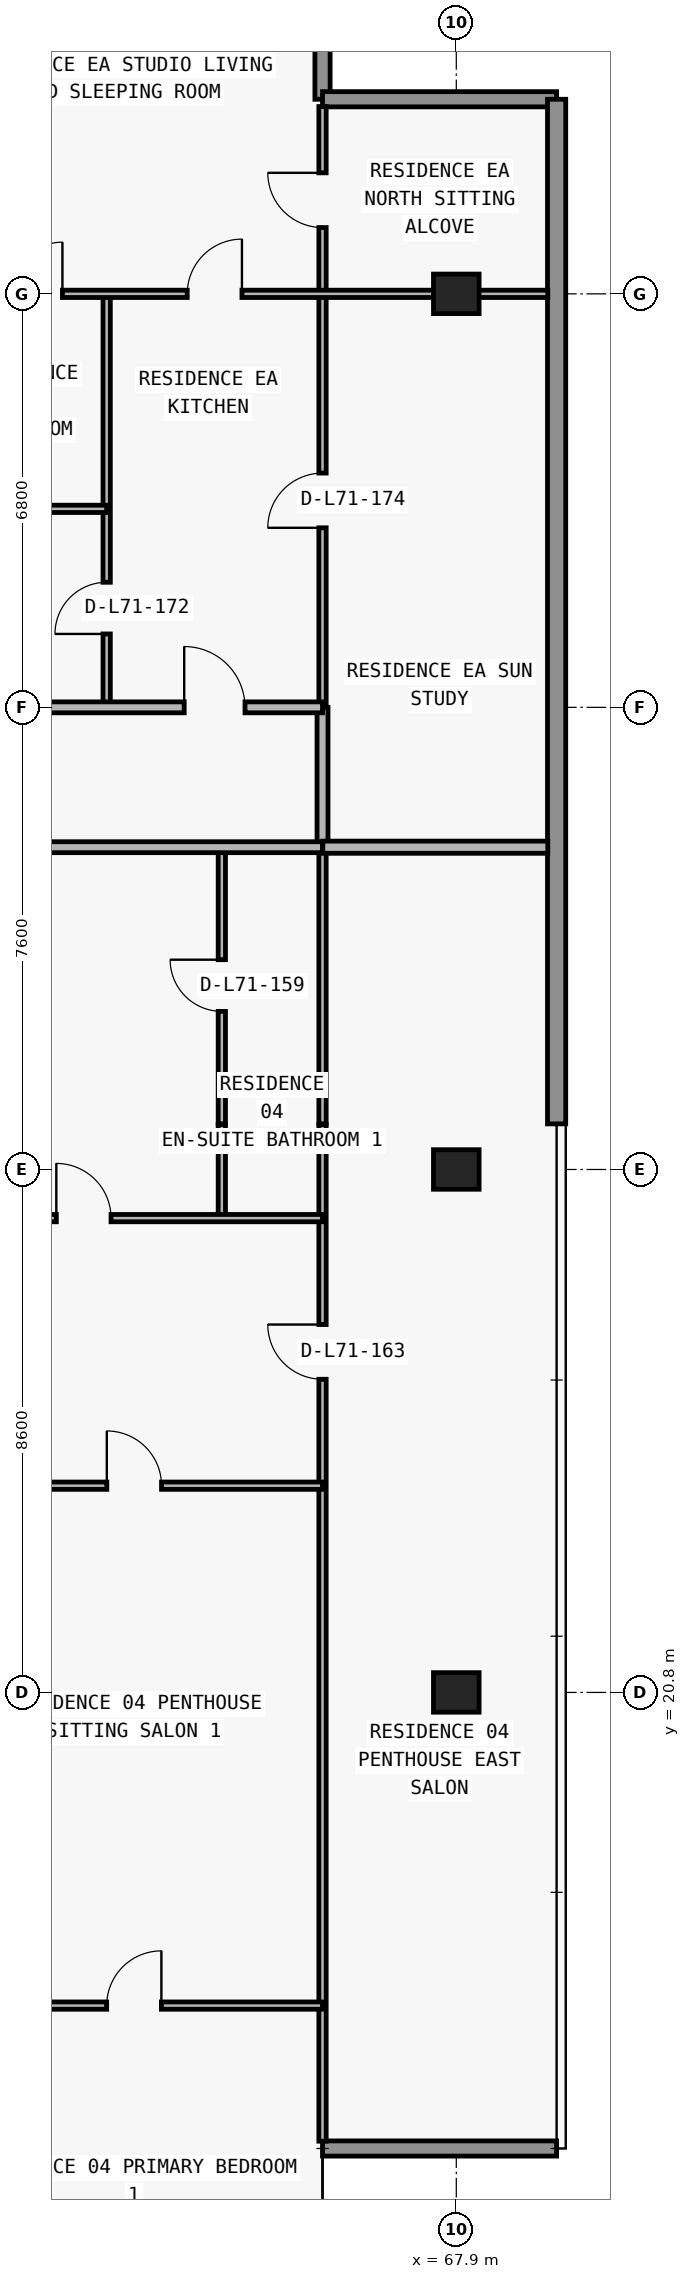
"""IFC4 building model, lengths in metres.
Left out: names, types, materials, properties, quantities, classifications, styles, units other than length and angle.
Written with IfcOpenShell. Run it as: python <this file> out.ifc"""

import sys

from ifc_helpers import new_model, si_unit, direction, frame, frame_2d, origin, origin_2d, place, context, subcontext, project, spatial, rectangle, extrude, element, fill, save


model = new_model("IFC4")
c1 = context("Model", 3, precision=1e-05, world=origin(), true_north=direction((0.0, 1.0)))
c2 = subcontext(c1, "Body", "Model", "MODEL_VIEW")
j1 = project(units=[si_unit("LENGTHUNIT", "METRE"), si_unit("PLANEANGLEUNIT", "RADIAN")], contexts=[c1])
p1 = place(None, origin())
s1 = spatial("IfcSite", under=j1, at=p1, CompositionType="ELEMENT")
p2 = place(p1, origin())
s2 = spatial("IfcBuilding", under=s1, at=p2, CompositionType="ELEMENT")
p3 = place(p2, frame((0.0, 0.0, 252.9)))
s3 = spatial("IfcBuildingStorey", under=s2, at=p3, CompositionType="ELEMENT", Elevation=252.9)
for number, where, z_axis, x_axis in (
    (1, (67.9, 20.8, 0.0), (0.0, 0.0, 1.0), (1.0, 0.0, 0.0)),
    (2, (67.9, 29.4, 0.0), (0.0, 0.0, 1.0), (1.0, 0.0, 0.0)),
    (3, (67.9, 43.8, 0.0), (0.0, 0.0, 1.0), (1.0, 0.0, 0.0)),
):
    element("IfcColumn", number, at=place(p3, frame(where, z_axis=z_axis, x_axis=x_axis)), inside=s3, PredefinedType="COLUMN", context=c2, shape_type="SweptSolid", body=[
        extrude(rectangle(XDim=0.75, YDim=0.65, at=origin_2d()), origin(), (0.0, 0.0, 1.0), 3.05),
    ])
p4 = place(p3, frame((65.7, 13.3, 0.0), z_axis=(0.0, 0.0, 1.0), x_axis=(1.0, 0.0, 0.0)))
e4 = element("IfcWall", 4, at=p4, inside=s3, PredefinedType="ELEMENTEDWALL", context=c2, shape_type="SweptSolid", body=[
    extrude(rectangle(XDim=3.85, YDim=0.25, at=frame_2d((1.925, 0.0))), origin(), (0.0, 0.0, 1.0), 3.05),
])
p5 = place(p3, frame((65.7, 50.45, 0.0), z_axis=(0.0, 0.0, 1.0), x_axis=(0.0, -1.0, 0.0)))
e5 = element("IfcWall", 5, at=p5, inside=s3, PredefinedType="ELEMENTEDWALL", context=c2, shape_type="SweptSolid", body=[
    extrude(rectangle(XDim=3.45, YDim=0.25, at=frame_2d((1.725, 0.0))), origin(), (0.0, 0.0, 1.0), 3.05),
])
p6 = place(p3, frame((65.7, 47.0, 0.0), z_axis=(0.0, 0.0, 1.0), x_axis=(1.0, 0.0, 0.0)))
e6 = element("IfcWall", 6, at=p6, inside=s3, PredefinedType="ELEMENTEDWALL", context=c2, shape_type="SweptSolid", body=[
    extrude(rectangle(XDim=3.85, YDim=0.25, at=frame_2d((1.925, 0.0))), origin(), (0.0, 0.0, 1.0), 3.05),
])
p7 = place(p3, frame((69.55, 47.0, 0.0), z_axis=(0.0, 0.0, 1.0), x_axis=(0.0, -1.0, 0.0)))
e7 = element("IfcWall", 7, at=p7, inside=s3, PredefinedType="STANDARD", context=c2, shape_type="SweptSolid", body=[
    extrude(rectangle(XDim=16.85, YDim=0.3, at=frame_2d((8.425, 0.0))), origin(), (0.0, 0.0, 1.0), 3.05),
])
p8 = place(p3, frame((62.15, 37.0, 0.0), z_axis=(0.0, 0.0, 1.0), x_axis=(0.0, 1.0, 0.0)))
e8 = element("IfcWall", 8, at=p8, inside=s3, PredefinedType="PARTITIONING", context=c2, shape_type="SweptSolid", body=[
    extrude(rectangle(XDim=6.8, YDim=0.12, at=frame_2d((3.4, 0.0))), origin(), (0.0, 0.0, 1.0), 3.05),
])
p9 = place(p8, frame((1.207, 0.0, 0.0)))
e9 = element("IfcOpeningElement", 9, at=p9, cuts=e8, PredefinedType="OPENING", context=c2, shape_type="SweptSolid", body=[
    extrude(rectangle(XDim=0.85, YDim=2.1, at=frame_2d((0.425, 1.05))), frame((0.0, 0.07, 0.0), z_axis=(0.0, -1.0, 0.0), x_axis=(1.0, 0.0, 0.0)), (0.0, 0.0, 1.0), 0.14),
])
p10 = place(p3, frame((64.044, 28.6, 0.0), z_axis=(0.0, 0.0, 1.0), x_axis=(0.0, 1.0, 0.0)))
e10 = element("IfcWall", 10, at=p10, inside=s3, PredefinedType="PARTITIONING", context=c2, shape_type="SweptSolid", body=[
    extrude(rectangle(XDim=1.54, YDim=0.12, at=frame_2d((0.77, 0.0))), origin(), (0.0, 0.0, 1.0), 3.05),
])
p11 = place(p3, frame((64.044, 30.15, 0.0), z_axis=(0.0, 0.0, 1.0), x_axis=(0.0, 1.0, 0.0)))
e11 = element("IfcWall", 11, at=p11, inside=s3, PredefinedType="PARTITIONING", context=c2, shape_type="SweptSolid", body=[
    extrude(rectangle(XDim=4.55, YDim=0.12, at=frame_2d((2.275, 0.0))), origin(), (0.0, 0.0, 1.0), 3.05),
])
p12 = place(p11, frame((1.85, 0.0, 0.0)))
e12 = element("IfcOpeningElement", 12, at=p12, cuts=e11, PredefinedType="OPENING", context=c2, shape_type="SweptSolid", body=[
    extrude(rectangle(XDim=0.85, YDim=2.1, at=frame_2d((0.425, 1.05))), frame((0.0, 0.07, 0.0), z_axis=(0.0, -1.0, 0.0), x_axis=(1.0, 0.0, 0.0)), (0.0, 0.0, 1.0), 0.14),
])
p13 = place(p3, frame((65.7, 13.42, 0.0), z_axis=(0.0, 0.0, 1.0), x_axis=(0.0, 1.0, 0.0)))
e13 = element("IfcWall", 13, at=p13, inside=s3, PredefinedType="PARTITIONING", context=c2, shape_type="SweptSolid", body=[
    extrude(rectangle(XDim=16.72, YDim=0.12, at=frame_2d((8.36, 0.0))), origin(), (0.0, 0.0, 1.0), 3.05),
])
p14 = place(p13, frame((12.53, 0.0, 0.0)))
e14 = element("IfcOpeningElement", 14, at=p14, cuts=e13, PredefinedType="OPENING", context=c2, shape_type="SweptSolid", body=[
    extrude(rectangle(XDim=0.9, YDim=2.15, at=frame_2d((0.45, 1.075))), frame((0.0, 0.07, 0.0), z_axis=(0.0, -1.0, 0.0), x_axis=(1.0, 0.0, 0.0)), (0.0, 0.0, 1.0), 0.14),
])
p15 = place(p3, frame((65.7, 30.15, 0.0), z_axis=(0.0, 0.0, 1.0), x_axis=(0.0, 1.0, 0.0)))
e15 = element("IfcWall", 15, at=p15, inside=s3, PredefinedType="PARTITIONING", context=c2, shape_type="SweptSolid", body=[
    extrude(rectangle(XDim=4.55, YDim=0.12, at=frame_2d((2.275, 0.0))), origin(), (0.0, 0.0, 1.0), 3.05),
])
p16 = place(p3, frame((65.7, 34.705, 0.0), z_axis=(0.0, 0.0, 1.0), x_axis=(0.0, 1.0, 0.0)))
e16 = element("IfcWall", 16, at=p16, inside=s3, PredefinedType="PARTITIONING", context=c2, shape_type="SweptSolid", body=[
    extrude(rectangle(XDim=2.295, YDim=0.18, at=frame_2d((1.147, 0.0))), origin(), (0.0, 0.0, 1.0), 3.05),
])
p17 = place(p3, frame((65.7, 37.005, 0.0), z_axis=(0.0, 0.0, 1.0), x_axis=(0.0, 1.0, 0.0)))
e17 = element("IfcWall", 17, at=p17, inside=s3, PredefinedType="PARTITIONING", context=c2, shape_type="SweptSolid", body=[
    extrude(rectangle(XDim=9.875, YDim=0.12, at=frame_2d((4.938, 0.0))), origin(), (0.0, 0.0, 1.0), 3.05),
])
p18 = place(p17, frame((2.948, 0.0, 0.0)))
e18 = element("IfcOpeningElement", 18, at=p18, cuts=e17, PredefinedType="OPENING", context=c2, shape_type="SweptSolid", body=[
    extrude(rectangle(XDim=0.9, YDim=2.15, at=frame_2d((0.45, 1.075))), frame((0.0, 0.07, 0.0), z_axis=(0.0, -1.0, 0.0), x_axis=(1.0, 0.0, 0.0)), (0.0, 0.0, 1.0), 0.14),
])
p19 = place(p17, frame((7.885, 0.0, 0.0)))
e19 = element("IfcOpeningElement", 19, at=p19, cuts=e17, PredefinedType="OPENING", context=c2, shape_type="SweptSolid", body=[
    extrude(rectangle(XDim=0.9, YDim=2.15, at=frame_2d((0.45, 1.075))), frame((0.0, 0.07, 0.0), z_axis=(0.0, -1.0, 0.0), x_axis=(1.0, 0.0, 0.0)), (0.0, 0.0, 1.0), 0.14),
])
p20 = place(p3, frame((59.5, 15.65, 0.0), z_axis=(0.0, 0.0, 1.0), x_axis=(1.0, 0.0, 0.0)))
e20 = element("IfcWall", 20, at=p20, inside=s3, PredefinedType="PARTITIONING", context=c2, shape_type="SweptSolid", body=[
    extrude(rectangle(XDim=6.2, YDim=0.12, at=frame_2d((3.1, 0.0))), origin(), (0.0, 0.0, 1.0), 3.05),
])
p21 = place(p20, frame((2.65, 0.0, 0.0)))
e21 = element("IfcOpeningElement", 21, at=p21, cuts=e20, PredefinedType="OPENING", context=c2, shape_type="SweptSolid", body=[
    extrude(rectangle(XDim=0.9, YDim=2.15, at=frame_2d((0.45, 1.075))), frame((0.0, 0.07, 0.0), z_axis=(0.0, -1.0, 0.0), x_axis=(1.0, 0.0, 0.0)), (0.0, 0.0, 1.0), 0.14),
])
p22 = place(p3, frame((59.505, 24.2, 0.0), z_axis=(0.0, 0.0, 1.0), x_axis=(1.0, 0.0, 0.0)))
e22 = element("IfcWall", 22, at=p22, inside=s3, PredefinedType="PARTITIONING", context=c2, shape_type="SweptSolid", body=[
    extrude(rectangle(XDim=6.195, YDim=0.12, at=frame_2d((3.098, 0.0))), origin(), (0.0, 0.0, 1.0), 3.05),
])
p23 = place(p22, frame((2.647, 0.0, 0.0)))
e23 = element("IfcOpeningElement", 23, at=p23, cuts=e22, PredefinedType="OPENING", context=c2, shape_type="SweptSolid", body=[
    extrude(rectangle(XDim=0.9, YDim=2.15, at=frame_2d((0.45, 1.075))), frame((0.0, 0.07, 0.0), z_axis=(0.0, -1.0, 0.0), x_axis=(1.0, 0.0, 0.0)), (0.0, 0.0, 1.0), 0.14),
])
p24 = place(p3, frame((59.5, 28.6, 0.0), z_axis=(0.0, 0.0, 1.0), x_axis=(1.0, 0.0, 0.0)))
e24 = element("IfcWall", 24, at=p24, inside=s3, PredefinedType="PARTITIONING", context=c2, shape_type="SweptSolid", body=[
    extrude(rectangle(XDim=6.2, YDim=0.12, at=frame_2d((3.1, 0.0))), origin(), (0.0, 0.0, 1.0), 3.05),
])
p25 = place(p24, frame((1.822, 0.0, 0.0)))
e25 = element("IfcOpeningElement", 25, at=p25, cuts=e24, PredefinedType="OPENING", context=c2, shape_type="SweptSolid", body=[
    extrude(rectangle(XDim=0.9, YDim=2.15, at=frame_2d((0.45, 1.075))), frame((0.0, 0.07, 0.0), z_axis=(0.0, -1.0, 0.0), x_axis=(1.0, 0.0, 0.0)), (0.0, 0.0, 1.0), 0.14),
])
p26 = place(p3, frame((26.7, 34.7, 0.0), z_axis=(0.0, 0.0, 1.0), x_axis=(1.0, 0.0, 0.0)))
e26 = element("IfcWall", 26, at=p26, inside=s3, PredefinedType="PARTITIONING", context=c2, shape_type="SweptSolid", body=[
    extrude(rectangle(XDim=39.0, YDim=0.18, at=frame_2d((19.5, 0.0))), origin(), (0.0, 0.0, 1.0), 3.05),
])
p27 = place(p26, frame((2.827, 0.0, 0.0)))
e27 = element("IfcOpeningElement", 27, at=p27, cuts=e26, PredefinedType="OPENING", context=c2, shape_type="SweptSolid", body=[
    extrude(rectangle(XDim=1.0, YDim=2.2, at=frame_2d((0.5, 1.1))), frame((0.0, 0.1, 0.0), z_axis=(0.0, -1.0, 0.0), x_axis=(1.0, 0.0, 0.0)), (0.0, 0.0, 1.0), 0.2),
])
p28 = place(p26, frame((27.27, 0.0, 0.0)))
e28 = element("IfcOpeningElement", 28, at=p28, cuts=e26, PredefinedType="OPENING", context=c2, shape_type="SweptSolid", body=[
    extrude(rectangle(XDim=1.0, YDim=2.2, at=frame_2d((0.5, 1.1))), frame((0.0, 0.1, 0.0), z_axis=(0.0, -1.0, 0.0), x_axis=(1.0, 0.0, 0.0)), (0.0, 0.0, 1.0), 0.2),
])
p29 = place(p3, frame((65.705, 34.7, 0.0), z_axis=(0.0, 0.0, 1.0), x_axis=(1.0, 0.0, 0.0)))
e29 = element("IfcWall", 29, at=p29, inside=s3, PredefinedType="PARTITIONING", context=c2, shape_type="SweptSolid", body=[
    extrude(rectangle(XDim=3.7, YDim=0.2, at=frame_2d((1.85, 0.0))), origin(), (0.0, 0.0, 1.0), 3.05),
])
p30 = place(p3, frame((59.855, 37.0, 0.0), z_axis=(0.0, 0.0, 1.0), x_axis=(1.0, 0.0, 0.0)))
e30 = element("IfcWall", 30, at=p30, inside=s3, PredefinedType="PARTITIONING", context=c2, shape_type="SweptSolid", body=[
    extrude(rectangle(XDim=5.845, YDim=0.18, at=frame_2d((2.922, 0.0))), origin(), (0.0, 0.0, 1.0), 3.05),
])
p31 = place(p30, frame((3.57, 0.0, 0.0)))
e31 = element("IfcOpeningElement", 31, at=p31, cuts=e30, PredefinedType="OPENING", context=c2, shape_type="SweptSolid", body=[
    extrude(rectangle(XDim=1.0, YDim=2.2, at=frame_2d((0.5, 1.1))), frame((0.0, 0.1, 0.0), z_axis=(0.0, -1.0, 0.0), x_axis=(1.0, 0.0, 0.0)), (0.0, 0.0, 1.0), 0.2),
])
p32 = place(p3, frame((59.845, 40.264, 0.0), z_axis=(0.0, 0.0, 1.0), x_axis=(1.0, 0.0, 0.0)))
e32 = element("IfcWall", 32, at=p32, inside=s3, PredefinedType="PARTITIONING", context=c2, shape_type="SweptSolid", body=[
    extrude(rectangle(XDim=2.305, YDim=0.12, at=frame_2d((1.152, 0.0))), origin(), (0.0, 0.0, 1.0), 3.05),
])
p33 = place(p3, frame((59.845, 43.8, 0.0), z_axis=(0.0, 0.0, 1.0), x_axis=(1.0, 0.0, 0.0)))
e33 = element("IfcWall", 33, at=p33, inside=s3, PredefinedType="PARTITIONING", context=c2, shape_type="SweptSolid", body=[
    extrude(rectangle(XDim=9.56, YDim=0.12, at=frame_2d((4.78, 0.0))), origin(), (0.0, 0.0, 1.0), 2.418),
])
p34 = place(p33, frame((3.63, 0.0, 0.0)))
e34 = element("IfcOpeningElement", 34, at=p34, cuts=e33, PredefinedType="OPENING", context=c2, shape_type="SweptSolid", body=[
    extrude(rectangle(XDim=0.9, YDim=2.15, at=frame_2d((0.45, 1.075))), frame((0.0, 0.07, 0.0), z_axis=(0.0, -1.0, 0.0), x_axis=(1.0, 0.0, 0.0)), (0.0, 0.0, 1.0), 0.14),
])
p35 = place(p33, frame((0.728, 0.0, 0.0)))
e35 = element("IfcOpeningElement", 35, at=p35, cuts=e33, PredefinedType="OPENING", context=c2, shape_type="SweptSolid", body=[
    extrude(rectangle(XDim=0.85, YDim=2.1, at=frame_2d((0.425, 1.05))), frame((0.0, 0.07, 0.0), z_axis=(0.0, -1.0, 0.0), x_axis=(1.0, 0.0, 0.0)), (0.0, 0.0, 1.0), 0.14),
])
p36 = place(p25, origin())
e36 = element("IfcDoor", 36, at=p36, inside=s3, OperationType="SINGLE_SWING_LEFT", PredefinedType="DOOR", context=c2, shape_type="SweptSolid", body=[
    extrude(rectangle(XDim=0.9, YDim=2.15, at=frame_2d((0.45, 1.075))), frame((0.0, 0.025, 0.0), z_axis=(0.0, -1.0, 0.0), x_axis=(1.0, 0.0, 0.0)), (0.0, 0.0, 1.0), 0.05),
])
fill(e25, e36)
p37 = place(p12, origin())
e37 = element("IfcDoor", 37, at=p37, inside=s3, OperationType="SINGLE_SWING_RIGHT", PredefinedType="DOOR", context=c2, shape_type="SweptSolid", body=[
    extrude(rectangle(XDim=0.85, YDim=2.1, at=frame_2d((0.425, 1.05))), frame((0.0, 0.025, 0.0), z_axis=(0.0, -1.0, 0.0), x_axis=(1.0, 0.0, 0.0)), (0.0, 0.0, 1.0), 0.05),
])
fill(e12, e37)
p38 = place(p23, origin())
e38 = element("IfcDoor", 38, at=p38, inside=s3, OperationType="SINGLE_SWING_LEFT", PredefinedType="DOOR", context=c2, shape_type="SweptSolid", body=[
    extrude(rectangle(XDim=0.9, YDim=2.15, at=frame_2d((0.45, 1.075))), frame((0.0, 0.025, 0.0), z_axis=(0.0, -1.0, 0.0), x_axis=(1.0, 0.0, 0.0)), (0.0, 0.0, 1.0), 0.05),
])
fill(e23, e38)
p39 = place(p21, origin())
e39 = element("IfcDoor", 39, at=p39, inside=s3, OperationType="SINGLE_SWING_RIGHT", PredefinedType="DOOR", context=c2, shape_type="SweptSolid", body=[
    extrude(rectangle(XDim=0.9, YDim=2.15, at=frame_2d((0.45, 1.075))), frame((0.0, 0.025, 0.0), z_axis=(0.0, -1.0, 0.0), x_axis=(1.0, 0.0, 0.0)), (0.0, 0.0, 1.0), 0.05),
])
fill(e21, e39)
p40 = place(p14, origin())
e40 = element("IfcDoor", 40, at=p40, inside=s3, OperationType="SINGLE_SWING_RIGHT", PredefinedType="DOOR", context=c2, shape_type="SweptSolid", body=[
    extrude(rectangle(XDim=0.9, YDim=2.15, at=frame_2d((0.45, 1.075))), frame((0.0, 0.025, 0.0), z_axis=(0.0, -1.0, 0.0), x_axis=(1.0, 0.0, 0.0)), (0.0, 0.0, 1.0), 0.05),
])
fill(e14, e40)
p41 = place(p31, origin())
e41 = element("IfcDoor", 41, at=p41, inside=s3, OperationType="SINGLE_SWING_LEFT", PredefinedType="DOOR", context=c2, shape_type="SweptSolid", body=[
    extrude(rectangle(XDim=1.0, YDim=2.2, at=frame_2d((0.5, 1.1))), frame((0.0, 0.025, 0.0), z_axis=(0.0, -1.0, 0.0), x_axis=(1.0, 0.0, 0.0)), (0.0, 0.0, 1.0), 0.05),
])
fill(e31, e41)
p42 = place(p34, origin())
e42 = element("IfcDoor", 42, at=p42, inside=s3, OperationType="SINGLE_SWING_RIGHT", PredefinedType="DOOR", context=c2, shape_type="SweptSolid", body=[
    extrude(rectangle(XDim=0.9, YDim=2.15, at=frame_2d((0.45, 1.075))), frame((0.0, 0.025, 0.0), z_axis=(0.0, -1.0, 0.0), x_axis=(1.0, 0.0, 0.0)), (0.0, 0.0, 1.0), 0.05),
])
fill(e34, e42)
p43 = place(p9, origin())
e43 = element("IfcDoor", 43, at=p43, inside=s3, OperationType="SINGLE_SWING_LEFT", PredefinedType="DOOR", context=c2, shape_type="SweptSolid", body=[
    extrude(rectangle(XDim=0.85, YDim=2.1, at=frame_2d((0.425, 1.05))), frame((0.0, 0.025, 0.0), z_axis=(0.0, -1.0, 0.0), x_axis=(1.0, 0.0, 0.0)), (0.0, 0.0, 1.0), 0.05),
])
fill(e9, e43)
p44 = place(p35, origin())
e44 = element("IfcDoor", 44, at=p44, inside=s3, OperationType="SINGLE_SWING_RIGHT", PredefinedType="DOOR", context=c2, shape_type="SweptSolid", body=[
    extrude(rectangle(XDim=0.85, YDim=2.1, at=frame_2d((0.425, 1.05))), frame((0.0, 0.025, 0.0), z_axis=(0.0, -1.0, 0.0), x_axis=(1.0, 0.0, 0.0)), (0.0, 0.0, 1.0), 0.05),
])
fill(e35, e44)
p45 = place(p18, origin())
e45 = element("IfcDoor", 45, at=p45, inside=s3, OperationType="SINGLE_SWING_LEFT", PredefinedType="DOOR", context=c2, shape_type="SweptSolid", body=[
    extrude(rectangle(XDim=0.9, YDim=2.15, at=frame_2d((0.45, 1.075))), frame((0.0, 0.025, 0.0), z_axis=(0.0, -1.0, 0.0), x_axis=(1.0, 0.0, 0.0)), (0.0, 0.0, 1.0), 0.05),
])
fill(e18, e45)
p46 = place(p19, origin())
e46 = element("IfcDoor", 46, at=p46, inside=s3, OperationType="SINGLE_SWING_RIGHT", PredefinedType="DOOR", context=c2, shape_type="SweptSolid", body=[
    extrude(rectangle(XDim=0.9, YDim=2.15, at=frame_2d((0.45, 1.075))), frame((0.0, 0.025, 0.0), z_axis=(0.0, -1.0, 0.0), x_axis=(1.0, 0.0, 0.0)), (0.0, 0.0, 1.0), 0.05),
])
fill(e19, e46)
save(model, sys.argv[1])
